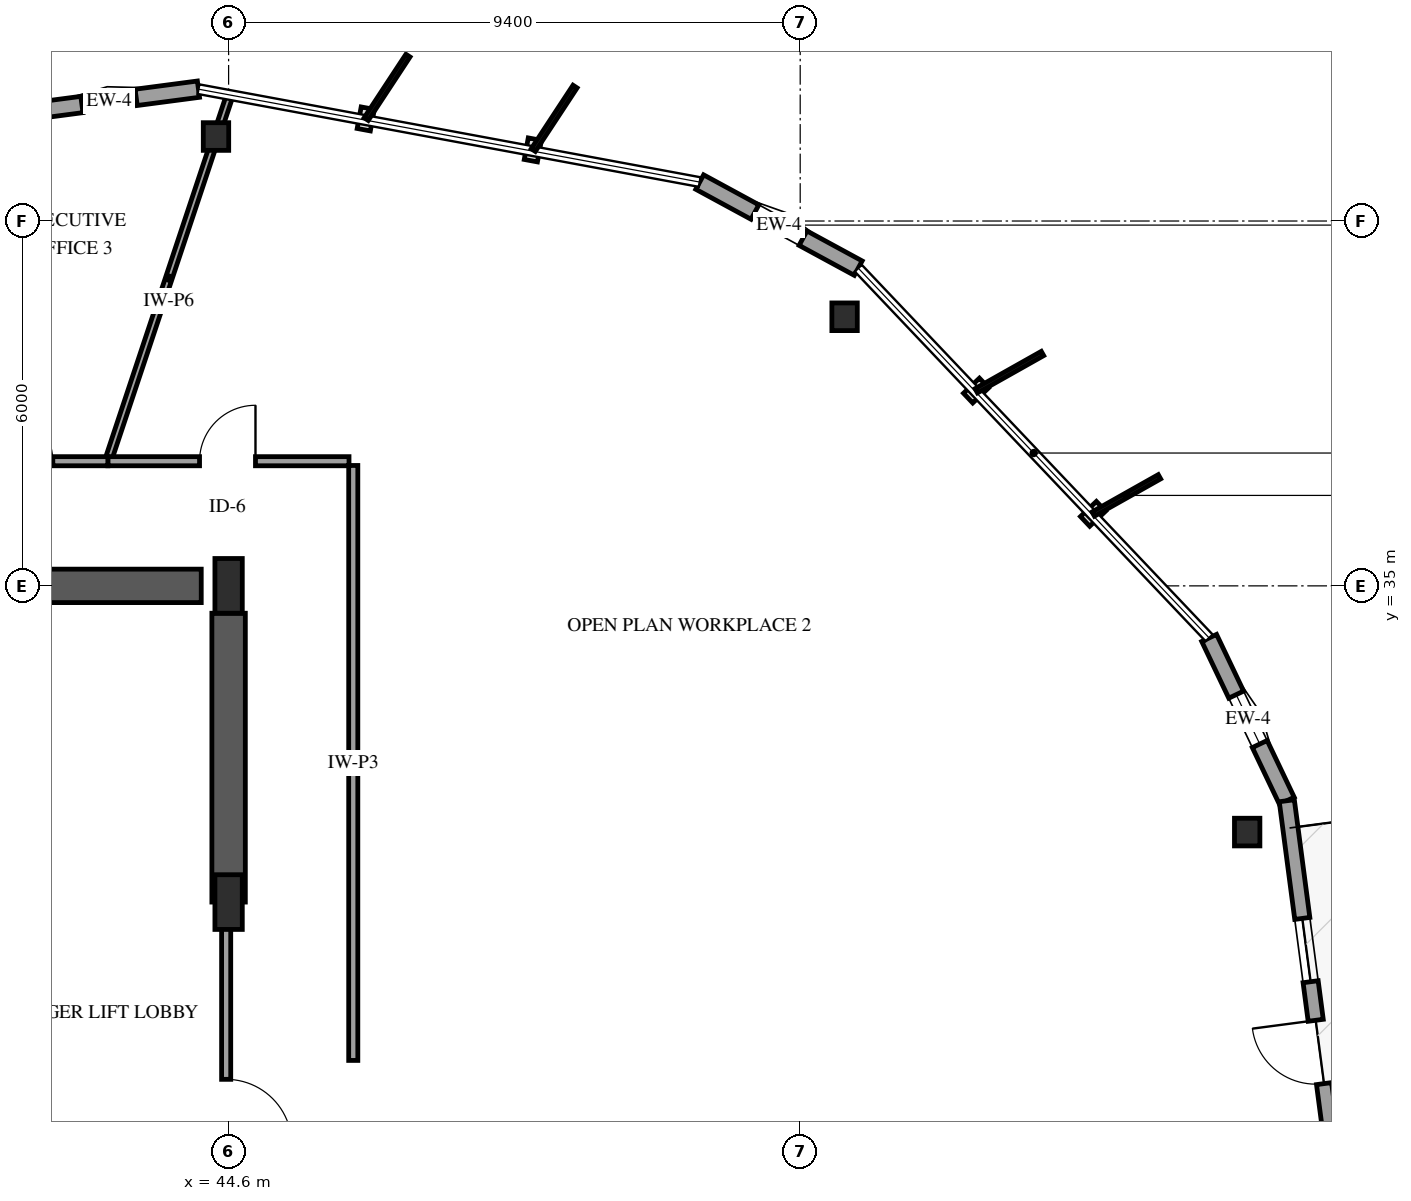
"""IFC4 building model, lengths in metres.
Left out: names, types, materials, properties, quantities, classifications, styles, units other than length and angle.
Written with IfcOpenShell. Run it as: python <this file> out.ifc"""

import sys

from ifc_helpers import new_model, si_unit, direction, frame, frame_2d, origin, origin_2d, place, context, subcontext, project, spatial, rectangle, i_section, extrude, element, fill, save


model = new_model("IFC4")
c1 = context("Model", 3, precision=1e-05, world=origin(), true_north=direction((0.0, 1.0)))
c2 = subcontext(c1, "Body", "Model", "MODEL_VIEW")
j1 = project(units=[si_unit("LENGTHUNIT", "METRE"), si_unit("PLANEANGLEUNIT", "RADIAN")], contexts=[c1])
p1 = place(None, origin())
s1 = spatial("IfcSite", under=j1, at=p1, CompositionType="ELEMENT")
p2 = place(p1, origin())
s2 = spatial("IfcBuilding", under=s1, at=p2, CompositionType="ELEMENT")
p3 = place(p2, frame((0.0, 0.0, 126.4)))
s3 = spatial("IfcBuildingStorey", under=s2, at=p3, CompositionType="ELEMENT", Elevation=126.4)
p4 = place(p3, frame((41.3, 35.0, 0.0), z_axis=(0.0, 0.0, 1.0), x_axis=(1.0, 0.0, 0.0)))
e1 = element("IfcWall", 1, at=p4, inside=s3, PredefinedType="SHEAR", context=c2, shape_type="SweptSolid", body=[
    extrude(rectangle(XDim=2.85, YDim=0.55, at=frame_2d((1.425, 0.0))), origin(), (0.0, 0.0, 1.0), 3.9),
])
p5 = place(p3, frame((44.6, 29.8, 0.0), z_axis=(0.0, 0.0, 1.0), x_axis=(0.0, 1.0, 0.0)))
e2 = element("IfcWall", 2, at=p5, inside=s3, PredefinedType="SHEAR", context=c2, shape_type="SweptSolid", body=[
    extrude(rectangle(XDim=4.75, YDim=0.55, at=frame_2d((2.375, 0.0))), origin(), (0.0, 0.0, 1.0), 3.9),
])
for number, where, z_axis, x_axis in (
    (3, (44.6, 29.8, 0.0), (0.0, 0.0, 1.0), (1.0, 0.0, 0.0)),
    (4, (44.6, 35.0, 0.0), (0.0, 0.0, 1.0), (1.0, 0.0, 0.0)),
):
    element("IfcColumn", number, at=place(p3, frame(where, z_axis=z_axis, x_axis=x_axis)), inside=s3, PredefinedType="PILASTER", context=c2, shape_type="SweptSolid", body=[
        extrude(rectangle(XDim=0.45, YDim=0.9, at=origin_2d()), origin(), (0.0, 0.0, 1.0), 3.9),
    ])
for number, where, z_axis, x_axis in (
    (5, (61.351, 30.951, 0.0), (0.0, 0.0, 1.0), (1.0, 0.0, 0.0)),
    (6, (54.73, 39.425, 0.0), (0.0, 0.0, 1.0), (1.0, 0.0, 0.0)),
    (7, (44.393, 42.389, 0.0), (0.0, 0.0, 1.0), (1.0, 0.0, 0.0)),
):
    element("IfcColumn", number, at=place(p3, frame(where, z_axis=z_axis, x_axis=x_axis)), inside=s3, PredefinedType="COLUMN", context=c2, shape_type="SweptSolid", body=[
        extrude(i_section(OverallWidth=0.418, OverallDepth=0.455, WebThickness=0.042, FlangeThickness=0.068, FilletRadius=0.038, at=origin_2d()), origin(), (0.0, 0.0, 1.0), 3.9),
    ])
p6 = place(p3, frame((54.954, 40.225, 0.0), z_axis=(0.0, 0.0, 1.0), x_axis=(-0.878806101886, 0.477179039028, 0.0)))
e8 = element("IfcWall", 8, at=p6, inside=s3, PredefinedType="SOLIDWALL", context=c2, shape_type="SweptSolid", body=[
    extrude(rectangle(XDim=2.967, YDim=0.27, at=frame_2d((1.483, 0.0))), origin(), (0.0, 0.0, 1.0), 2.979),
])
p7 = place(p6, frame((1.033, 0.0, 0.75)))
e9 = element("IfcOpeningElement", 9, at=p7, cuts=e8, PredefinedType="OPENING", context=c2, shape_type="SweptSolid", body=[
    extrude(rectangle(XDim=0.9, YDim=1.5, at=frame_2d((0.45, 0.75))), frame((0.0, 0.145, 0.0), z_axis=(0.0, -1.0, 0.0), x_axis=(1.0, 0.0, 0.0)), (0.0, 0.0, 1.0), 0.29),
])
p8 = place(p3, frame((44.104, 43.168, 0.0), z_axis=(0.0, 0.0, 1.0), x_axis=(-0.991434395997, -0.130605660036, 0.0)))
e10 = element("IfcWall", 10, at=p8, inside=s3, PredefinedType="SOLIDWALL", context=c2, shape_type="SweptSolid", body=[
    extrude(rectangle(XDim=2.967, YDim=0.27, at=frame_2d((1.483, 0.0))), origin(), (0.0, 0.0, 1.0), 2.979),
])
p9 = place(p8, frame((1.033, 0.0, 0.75)))
e11 = element("IfcOpeningElement", 11, at=p9, cuts=e10, PredefinedType="OPENING", context=c2, shape_type="SweptSolid", body=[
    extrude(rectangle(XDim=0.9, YDim=1.5, at=frame_2d((0.45, 0.75))), frame((0.0, 0.145, 0.0), z_axis=(0.0, -1.0, 0.0), x_axis=(1.0, 0.0, 0.0)), (0.0, 0.0, 1.0), 0.29),
])
p10 = place(p3, frame((62.002, 31.466, 0.0), z_axis=(0.0, 0.0, 1.0), x_axis=(-0.430511722547, 0.902584985887, 0.0)))
e12 = element("IfcWall", 12, at=p10, inside=s3, PredefinedType="SOLIDWALL", context=c2, shape_type="SweptSolid", body=[
    extrude(rectangle(XDim=2.967, YDim=0.27, at=frame_2d((1.483, 0.0))), origin(), (0.0, 0.0, 1.0), 2.979),
])
p11 = place(p10, frame((1.033, 0.0, 0.75)))
e13 = element("IfcOpeningElement", 13, at=p11, cuts=e12, PredefinedType="OPENING", context=c2, shape_type="SweptSolid", body=[
    extrude(rectangle(XDim=0.9, YDim=1.5, at=frame_2d((0.45, 0.75))), frame((0.0, 0.145, 0.0), z_axis=(0.0, -1.0, 0.0), x_axis=(1.0, 0.0, 0.0)), (0.0, 0.0, 1.0), 0.29),
])
p12 = place(p3, frame((63.097, 23.155, 0.0), z_axis=(0.0, 0.0, 1.0), x_axis=(-0.130551689343, 0.99144150428, 0.0)))
e14 = element("IfcWall", 14, at=p12, inside=s3, PredefinedType="SOLIDWALL", context=c2, shape_type="SweptSolid", body=[
    extrude(rectangle(XDim=8.384, YDim=0.25, at=frame_2d((4.192, 0.0))), origin(), (0.0, 0.0, 1.0), 2.979),
])
p13 = place(p12, frame((3.692, 0.0, 0.0)))
e15 = element("IfcOpeningElement", 15, at=p13, cuts=e14, PredefinedType="OPENING", context=c2, shape_type="SweptSolid", body=[
    extrude(rectangle(XDim=1.05, YDim=2.15, at=frame_2d((0.525, 1.075))), frame((0.0, 0.135, 0.0), z_axis=(0.0, -1.0, 0.0), x_axis=(1.0, 0.0, 0.0)), (0.0, 0.0, 1.0), 0.27),
])
p14 = place(p12, frame((1.221, 0.0, 0.72)))
e16 = element("IfcOpeningElement", 16, at=p14, cuts=e14, PredefinedType="OPENING", context=c2, shape_type="SweptSolid", body=[
    extrude(rectangle(XDim=1.05, YDim=1.55, at=frame_2d((0.525, 0.775))), frame((0.0, 0.135, 0.0), z_axis=(0.0, -1.0, 0.0), x_axis=(1.0, 0.0, 0.0)), (0.0, 0.0, 1.0), 0.27),
])
p15 = place(p12, frame((5.382, 0.0, 0.72)))
e17 = element("IfcOpeningElement", 17, at=p15, cuts=e14, PredefinedType="OPENING", context=c2, shape_type="SweptSolid", body=[
    extrude(rectangle(XDim=1.05, YDim=1.55, at=frame_2d((0.525, 0.775))), frame((0.0, 0.135, 0.0), z_axis=(0.0, -1.0, 0.0), x_axis=(1.0, 0.0, 0.0)), (0.0, 0.0, 1.0), 0.27),
])
p16 = place(p3, frame((44.56, 29.8, 0.0), z_axis=(0.0, 0.0, 1.0), x_axis=(0.0, -1.0, 0.0)))
e18 = element("IfcWall", 18, at=p16, inside=s3, PredefinedType="PARTITIONING", context=c2, shape_type="SweptSolid", body=[
    extrude(rectangle(XDim=6.91, YDim=0.15, at=frame_2d((3.455, 0.0))), origin(), (0.0, 0.0, 1.0), 2.64),
])
p17 = place(p16, frame((2.915, 0.0, 0.0)))
e19 = element("IfcOpeningElement", 19, at=p17, cuts=e18, PredefinedType="OPENING", context=c2, shape_type="SweptSolid", body=[
    extrude(rectangle(XDim=1.08, YDim=2.15, at=frame_2d((0.54, 1.075))), frame((0.0, 0.085, 0.0), z_axis=(0.0, -1.0, 0.0), x_axis=(1.0, 0.0, 0.0)), (0.0, 0.0, 1.0), 0.17),
])
p18 = place(p3, frame((42.614, 37.05, 0.0), z_axis=(0.0, 0.0, 1.0), x_axis=(0.316147007212, 0.948710213833, 0.0)))
e20 = element("IfcWall", 20, at=p18, inside=s3, PredefinedType="PARTITIONING", context=c2, shape_type="SweptSolid", body=[
    extrude(rectangle(XDim=6.349, YDim=0.11, at=frame_2d((3.174, 0.0))), origin(), (0.0, 0.0, 1.0), 2.895),
])
p19 = place(p3, frame((42.614, 37.05, 0.0), z_axis=(0.0, 0.0, 1.0), x_axis=(1.0, 0.0, 0.0)))
e21 = element("IfcWall", 21, at=p19, inside=s3, PredefinedType="PARTITIONING", context=c2, shape_type="SweptSolid", body=[
    extrude(rectangle(XDim=3.966, YDim=0.15, at=frame_2d((1.983, 0.0))), origin(), (0.0, 0.0, 1.0), 3.6),
])
p20 = place(p19, frame((1.508, 0.0, 0.0)))
e22 = element("IfcOpeningElement", 22, at=p20, cuts=e21, PredefinedType="OPENING", context=c2, shape_type="SweptSolid", body=[
    extrude(rectangle(XDim=0.92, YDim=2.12, at=frame_2d((0.46, 1.06))), frame((0.0, 0.085, 0.0), z_axis=(0.0, -1.0, 0.0), x_axis=(1.0, 0.0, 0.0)), (0.0, 0.0, 1.0), 0.17),
])
p21 = place(p3, frame((39.914, 37.05, 0.0), z_axis=(0.0, 0.0, 1.0), x_axis=(1.0, 0.0, 0.0)))
e23 = element("IfcWall", 23, at=p21, inside=s3, PredefinedType="PARTITIONING", context=c2, shape_type="SweptSolid", body=[
    extrude(rectangle(XDim=2.7, YDim=0.15, at=frame_2d((1.35, 0.0))), origin(), (0.0, 0.0, 1.0), 3.6),
])
p22 = place(p21, frame((0.875, 0.0, 0.0)))
e24 = element("IfcOpeningElement", 24, at=p22, cuts=e23, PredefinedType="OPENING", context=c2, shape_type="SweptSolid", body=[
    extrude(rectangle(XDim=0.92, YDim=2.12, at=frame_2d((0.46, 1.06))), frame((0.0, 0.085, 0.0), z_axis=(0.0, -1.0, 0.0), x_axis=(1.0, 0.0, 0.0)), (0.0, 0.0, 1.0), 0.17),
])
p23 = place(p3, frame((46.65, 36.98, 0.0), z_axis=(0.0, 0.0, 1.0), x_axis=(0.0, -1.0, 0.0)))
e25 = element("IfcWall", 25, at=p23, inside=s3, PredefinedType="PARTITIONING", context=c2, shape_type="SweptSolid", body=[
    extrude(rectangle(XDim=9.784, YDim=0.15, at=frame_2d((4.892, 0.0))), origin(), (0.0, 0.0, 1.0), 3.6),
])
p24 = place(p7, origin())
e26 = element("IfcWindow", 26, at=p24, inside=s3, PartitioningType="SINGLE_PANEL", PredefinedType="WINDOW", context=c2, shape_type="SweptSolid", body=[
    extrude(rectangle(XDim=0.9, YDim=1.5, at=frame_2d((0.45, 0.75))), frame((0.0, 0.03, 0.0), z_axis=(0.0, -1.0, 0.0), x_axis=(1.0, 0.0, 0.0)), (0.0, 0.0, 1.0), 0.06),
])
fill(e9, e26)
p25 = place(p9, origin())
e27 = element("IfcWindow", 27, at=p25, inside=s3, PartitioningType="SINGLE_PANEL", PredefinedType="WINDOW", context=c2, shape_type="SweptSolid", body=[
    extrude(rectangle(XDim=0.9, YDim=1.5, at=frame_2d((0.45, 0.75))), frame((0.0, 0.03, 0.0), z_axis=(0.0, -1.0, 0.0), x_axis=(1.0, 0.0, 0.0)), (0.0, 0.0, 1.0), 0.06),
])
fill(e11, e27)
p26 = place(p11, origin())
e28 = element("IfcWindow", 28, at=p26, inside=s3, PartitioningType="SINGLE_PANEL", PredefinedType="WINDOW", context=c2, shape_type="SweptSolid", body=[
    extrude(rectangle(XDim=0.9, YDim=1.5, at=frame_2d((0.45, 0.75))), frame((0.0, 0.03, 0.0), z_axis=(0.0, -1.0, 0.0), x_axis=(1.0, 0.0, 0.0)), (0.0, 0.0, 1.0), 0.06),
])
fill(e13, e28)
p27 = place(p13, origin())
e29 = element("IfcDoor", 29, at=p27, inside=s3, OperationType="SINGLE_SWING_RIGHT", PredefinedType="DOOR", context=c2, shape_type="SweptSolid", body=[
    extrude(rectangle(XDim=1.05, YDim=2.15, at=frame_2d((0.525, 1.075))), frame((0.0, 0.025, 0.0), z_axis=(0.0, -1.0, 0.0), x_axis=(1.0, 0.0, 0.0)), (0.0, 0.0, 1.0), 0.05),
])
fill(e15, e29)
p28 = place(p15, origin())
e30 = element("IfcWindow", 30, at=p28, inside=s3, PartitioningType="SINGLE_PANEL", PredefinedType="WINDOW", context=c2, shape_type="SweptSolid", body=[
    extrude(rectangle(XDim=1.05, YDim=1.55, at=frame_2d((0.525, 0.775))), frame((0.0, 0.03, 0.0), z_axis=(0.0, -1.0, 0.0), x_axis=(1.0, 0.0, 0.0)), (0.0, 0.0, 1.0), 0.06),
])
fill(e17, e30)
p29 = place(p17, origin())
e31 = element("IfcDoor", 31, at=p29, inside=s3, OperationType="SINGLE_SWING_RIGHT", PredefinedType="DOOR", context=c2, shape_type="SweptSolid", body=[
    extrude(rectangle(XDim=1.08, YDim=2.15, at=frame_2d((0.54, 1.075))), frame((0.0, 0.025, 0.0), z_axis=(0.0, -1.0, 0.0), x_axis=(1.0, 0.0, 0.0)), (0.0, 0.0, 1.0), 0.05),
])
fill(e19, e31)
p30 = place(p20, origin())
e32 = element("IfcDoor", 32, at=p30, inside=s3, OperationType="SINGLE_SWING_RIGHT", PredefinedType="DOOR", context=c2, shape_type="SweptSolid", body=[
    extrude(rectangle(XDim=0.92, YDim=2.12, at=frame_2d((0.46, 1.06))), frame((0.0, 0.025, 0.0), z_axis=(0.0, -1.0, 0.0), x_axis=(1.0, 0.0, 0.0)), (0.0, 0.0, 1.0), 0.05),
])
fill(e22, e32)
save(model, sys.argv[1])
